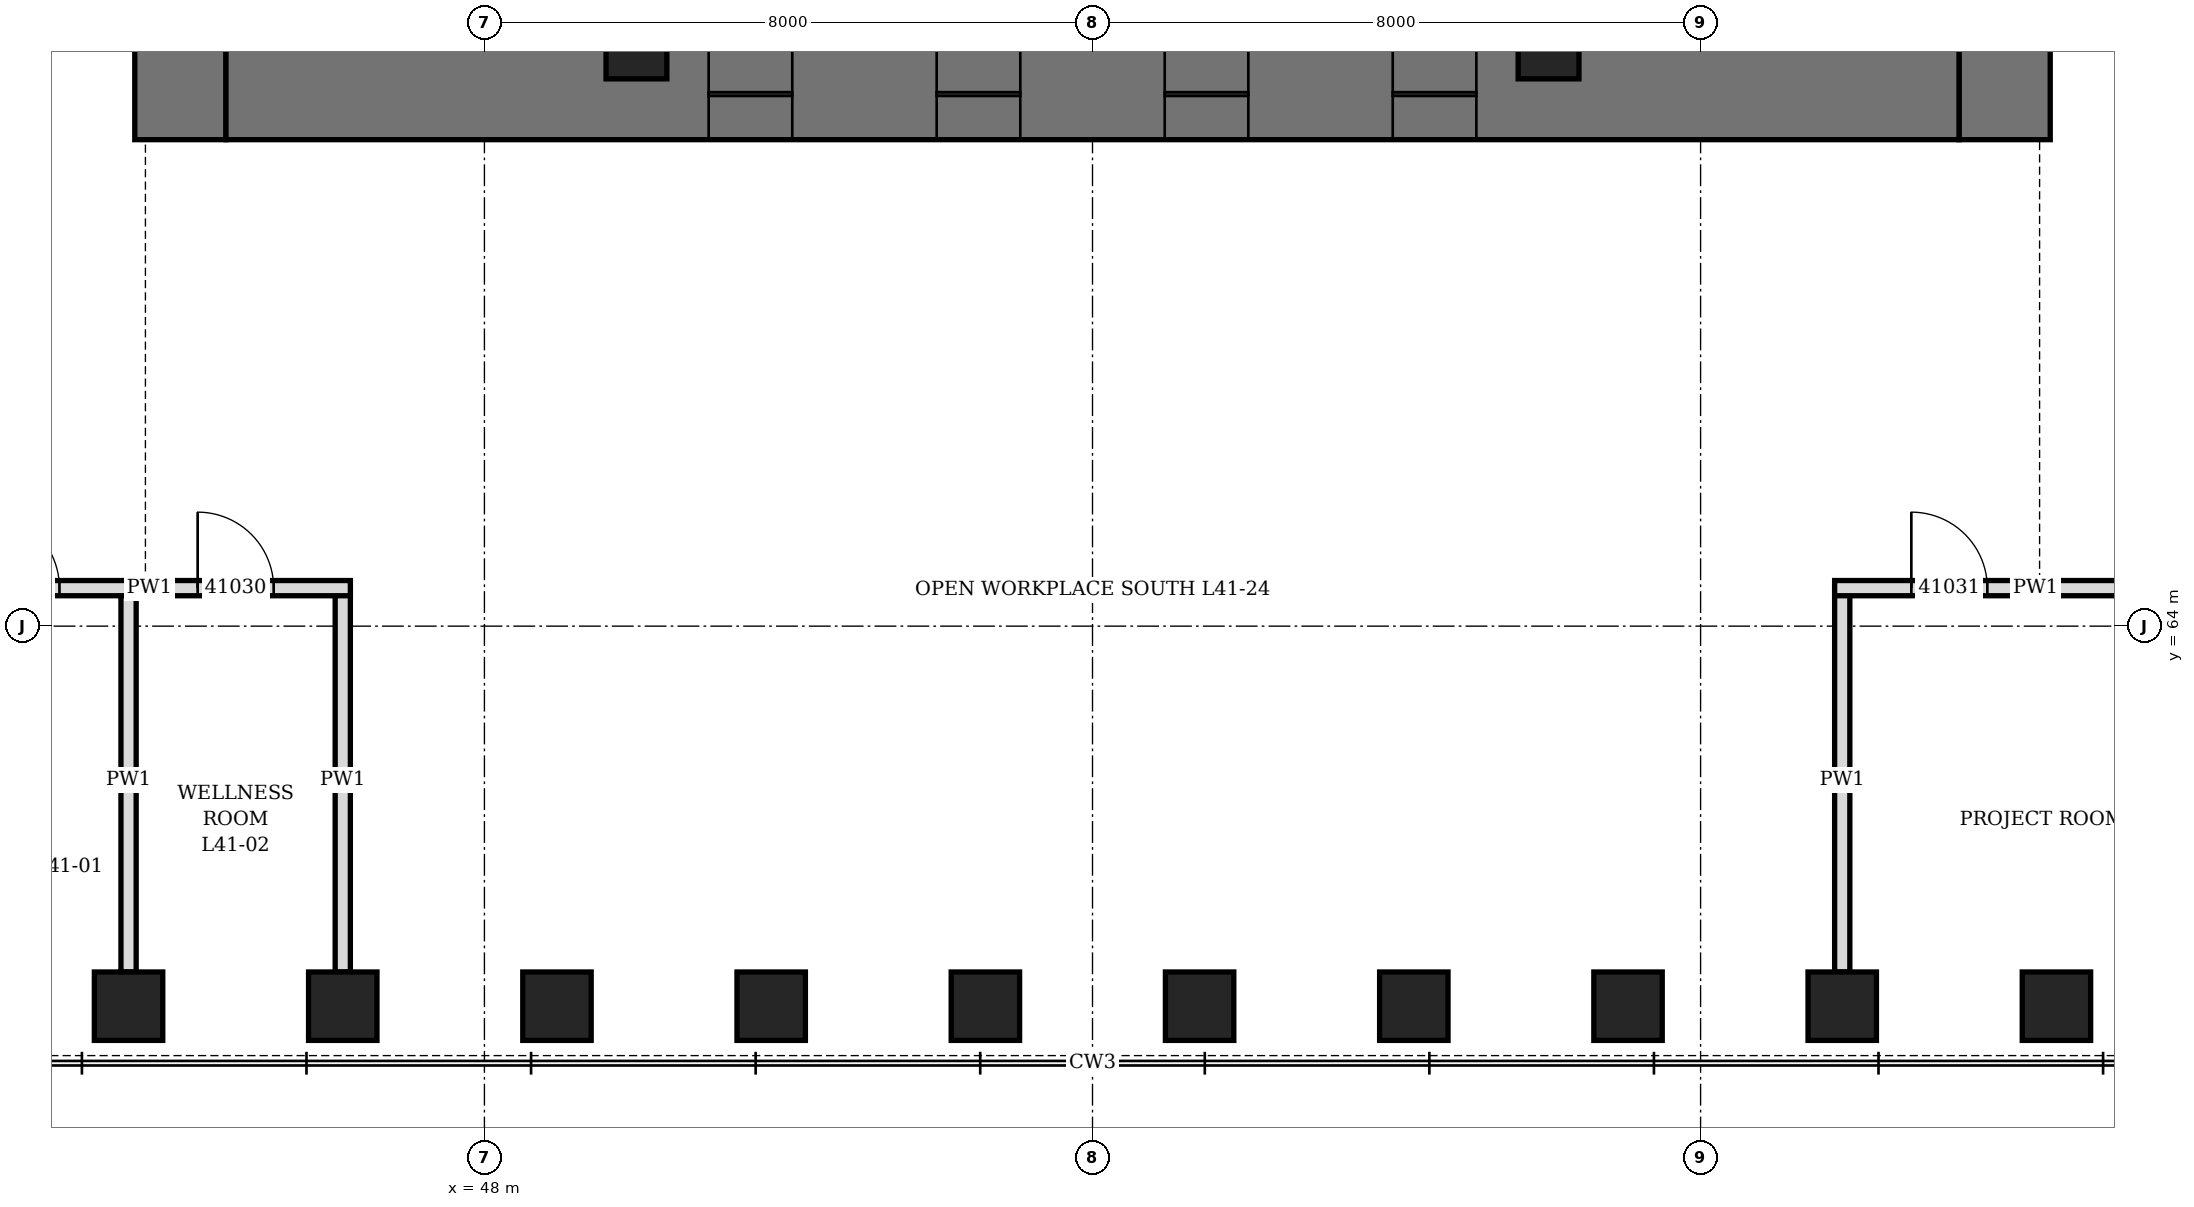
"""IFC4 building model, lengths in metres.
Left out: names, types, materials, properties, quantities, classifications, styles, units other than length and angle.
Written with IfcOpenShell. Run it as: python <this file> out.ifc"""

import sys

from ifc_helpers import new_model, si_unit, direction, frame, frame_2d, origin, origin_2d, place, context, subcontext, project, spatial, rectangle, hollow_rectangle, extrude, element, fill, save


model = new_model("IFC4")
c1 = context("Model", 3, precision=1e-05, world=origin(), true_north=direction((0.0, 1.0)))
c2 = subcontext(c1, "Body", "Model", "MODEL_VIEW")
j1 = project(units=[si_unit("LENGTHUNIT", "METRE"), si_unit("PLANEANGLEUNIT", "RADIAN")], contexts=[c1])
p1 = place(None, origin())
s1 = spatial("IfcSite", under=j1, at=p1, CompositionType="ELEMENT")
p2 = place(p1, origin())
s2 = spatial("IfcBuilding", under=s1, at=p2, CompositionType="ELEMENT")
p3 = place(p2, frame((0.0, 0.0, 185.5)))
s3 = spatial("IfcBuildingStorey", under=s2, at=p3, CompositionType="ELEMENT", Elevation=185.5)
for number, where, z_axis, x_axis in (
    (1, (43.318, 59.0, 0.0), (0.0, 0.0, 1.0), (1.0, 0.0, 0.0)),
    (2, (46.136, 59.0, 0.0), (0.0, 0.0, 1.0), (1.0, 0.0, 0.0)),
    (3, (48.955, 59.0, 0.0), (0.0, 0.0, 1.0), (1.0, 0.0, 0.0)),
    (4, (51.773, 59.0, 0.0), (0.0, 0.0, 1.0), (1.0, 0.0, 0.0)),
    (5, (54.591, 59.0, 0.0), (0.0, 0.0, 1.0), (1.0, 0.0, 0.0)),
    (6, (57.409, 59.0, 0.0), (0.0, 0.0, 1.0), (1.0, 0.0, 0.0)),
    (7, (60.227, 59.0, 0.0), (0.0, 0.0, 1.0), (1.0, 0.0, 0.0)),
    (8, (63.045, 59.0, 0.0), (0.0, 0.0, 1.0), (1.0, 0.0, 0.0)),
    (9, (65.864, 59.0, 0.0), (0.0, 0.0, 1.0), (1.0, 0.0, 0.0)),
    (10, (68.682, 59.0, 0.0), (0.0, 0.0, 1.0), (1.0, 0.0, 0.0)),
):
    element("IfcColumn", number, at=place(p3, frame(where, z_axis=z_axis, x_axis=x_axis)), inside=s3, PredefinedType="COLUMN", context=c2, shape_type="SweptSolid", body=[
        extrude(hollow_rectangle(XDim=0.9, YDim=0.9, WallThickness=0.12, at=origin_2d()), origin(), (0.0, 0.0, 1.0), 4.2),
    ])
p4 = place(p3, frame((44.0, 70.4, 0.0), z_axis=(0.0, 0.0, 1.0), x_axis=(0.0, 1.0, 0.0)))
e11 = element("IfcWall", 11, at=p4, inside=s3, PredefinedType="SHEAR", context=c2, shape_type="SweptSolid", body=[
    extrude(rectangle(XDim=19.2, YDim=1.2, at=frame_2d((9.6, 0.0))), origin(), (0.0, 0.0, 1.0), 4.2),
])
p5 = place(p4, frame((8.6, 0.0, 0.0)))
e12 = element("IfcOpeningElement", 12, at=p5, cuts=e11, PredefinedType="OPENING", context=c2, shape_type="SweptSolid", body=[
    extrude(rectangle(XDim=2.0, YDim=2.4, at=frame_2d((1.0, 1.2))), frame((0.0, 0.61, 0.0), z_axis=(0.0, -1.0, 0.0), x_axis=(1.0, 0.0, 0.0)), (0.0, 0.0, 1.0), 1.22),
])
p6 = place(p3, frame((68.0, 70.4, 0.0), z_axis=(0.0, 0.0, 1.0), x_axis=(0.0, 1.0, 0.0)))
e13 = element("IfcWall", 13, at=p6, inside=s3, PredefinedType="SHEAR", context=c2, shape_type="SweptSolid", body=[
    extrude(rectangle(XDim=19.2, YDim=1.2, at=frame_2d((9.6, 0.0))), origin(), (0.0, 0.0, 1.0), 4.2),
])
p7 = place(p6, frame((8.6, 0.0, 0.0)))
e14 = element("IfcOpeningElement", 14, at=p7, cuts=e13, PredefinedType="OPENING", context=c2, shape_type="SweptSolid", body=[
    extrude(rectangle(XDim=2.0, YDim=2.4, at=frame_2d((1.0, 1.2))), frame((0.0, 0.61, 0.0), z_axis=(0.0, -1.0, 0.0), x_axis=(1.0, 0.0, 0.0)), (0.0, 0.0, 1.0), 1.22),
])
p8 = place(p3, frame((44.6, 71.0, 0.0), z_axis=(0.0, 0.0, 1.0), x_axis=(1.0, 0.0, 0.0)))
e15 = element("IfcWall", 15, at=p8, inside=s3, PredefinedType="SHEAR", context=c2, shape_type="SweptSolid", body=[
    extrude(rectangle(XDim=22.8, YDim=1.2, at=frame_2d((11.4, 0.0))), origin(), (0.0, 0.0, 1.0), 4.2),
])
p9 = place(p8, frame((6.35, 0.0, 0.0)))
e16 = element("IfcOpeningElement", 16, at=p9, cuts=e15, PredefinedType="OPENING", context=c2, shape_type="SweptSolid", body=[
    extrude(rectangle(XDim=1.1, YDim=2.2, at=frame_2d((0.55, 1.1))), frame((0.0, 0.61, 0.0), z_axis=(0.0, -1.0, 0.0), x_axis=(1.0, 0.0, 0.0)), (0.0, 0.0, 1.0), 1.22),
])
p10 = place(p8, frame((9.35, 0.0, 0.0)))
e17 = element("IfcOpeningElement", 17, at=p10, cuts=e15, PredefinedType="OPENING", context=c2, shape_type="SweptSolid", body=[
    extrude(rectangle(XDim=1.1, YDim=2.2, at=frame_2d((0.55, 1.1))), frame((0.0, 0.61, 0.0), z_axis=(0.0, -1.0, 0.0), x_axis=(1.0, 0.0, 0.0)), (0.0, 0.0, 1.0), 1.22),
])
p11 = place(p8, frame((12.35, 0.0, 0.0)))
e18 = element("IfcOpeningElement", 18, at=p11, cuts=e15, PredefinedType="OPENING", context=c2, shape_type="SweptSolid", body=[
    extrude(rectangle(XDim=1.1, YDim=2.2, at=frame_2d((0.55, 1.1))), frame((0.0, 0.61, 0.0), z_axis=(0.0, -1.0, 0.0), x_axis=(1.0, 0.0, 0.0)), (0.0, 0.0, 1.0), 1.22),
])
p12 = place(p8, frame((15.35, 0.0, 0.0)))
e19 = element("IfcOpeningElement", 19, at=p12, cuts=e15, PredefinedType="OPENING", context=c2, shape_type="SweptSolid", body=[
    extrude(rectangle(XDim=1.1, YDim=2.2, at=frame_2d((0.55, 1.1))), frame((0.0, 0.61, 0.0), z_axis=(0.0, -1.0, 0.0), x_axis=(1.0, 0.0, 0.0)), (0.0, 0.0, 1.0), 1.22),
])
for number, where, z_axis, x_axis in (
    (20, (50.0, 71.6, 0.0), (0.0, 0.0, 1.0), (1.0, 0.0, 0.0)),
    (21, (62.0, 71.6, 0.0), (0.0, 0.0, 1.0), (1.0, 0.0, 0.0)),
):
    element("IfcColumn", number, at=place(p3, frame(where, z_axis=z_axis, x_axis=x_axis)), inside=s3, PredefinedType="COLUMN", context=c2, shape_type="SweptSolid", body=[
        extrude(hollow_rectangle(XDim=0.8, YDim=0.8, WallThickness=0.1, at=origin_2d()), origin(), (0.0, 0.0, 1.0), 4.2),
    ])
for number, where, z_axis, x_axis in (
    (22, (43.318, 59.45, 0.0), (0.0, 0.0, 1.0), (0.0, 1.0, 0.0)),
    (23, (46.136, 59.45, 0.0), (0.0, 0.0, 1.0), (0.0, 1.0, 0.0)),
    (24, (65.864, 59.45, 0.0), (0.0, 0.0, 1.0), (0.0, 1.0, 0.0)),
):
    element("IfcWall", number, at=place(p3, frame(where, z_axis=z_axis, x_axis=x_axis)), inside=s3, PredefinedType="PARTITIONING", context=c2, shape_type="SweptSolid", body=[
        extrude(rectangle(XDim=5.05, YDim=0.2, at=frame_2d((2.525, 0.0))), origin(), (0.0, 0.0, 1.0), 3.428),
    ])
p13 = place(p3, frame((40.95, 64.5, 0.0), z_axis=(0.0, 0.0, 1.0), x_axis=(1.0, 0.0, 0.0)))
e25 = element("IfcWall", 25, at=p13, inside=s3, PredefinedType="PARTITIONING", context=c2, shape_type="SweptSolid", body=[
    extrude(rectangle(XDim=5.286, YDim=0.2, at=frame_2d((2.643, 0.0))), origin(), (0.0, 0.0, 1.0), 4.04),
])
p14 = place(p13, frame((0.459, 0.0, 0.0)))
e26 = element("IfcOpeningElement", 26, at=p14, cuts=e25, PredefinedType="OPENING", context=c2, shape_type="SweptSolid", body=[
    extrude(rectangle(XDim=1.0, YDim=2.1, at=frame_2d((0.5, 1.05))), frame((0.0, 0.11, 0.0), z_axis=(0.0, -1.0, 0.0), x_axis=(1.0, 0.0, 0.0)), (0.0, 0.0, 1.0), 0.22),
])
p15 = place(p13, frame((3.277, 0.0, 0.0)))
e27 = element("IfcOpeningElement", 27, at=p15, cuts=e25, PredefinedType="OPENING", context=c2, shape_type="SweptSolid", body=[
    extrude(rectangle(XDim=1.0, YDim=2.1, at=frame_2d((0.5, 1.05))), frame((0.0, 0.11, 0.0), z_axis=(0.0, -1.0, 0.0), x_axis=(1.0, 0.0, 0.0)), (0.0, 0.0, 1.0), 0.22),
])
p16 = place(p3, frame((65.764, 64.5, 0.0), z_axis=(0.0, 0.0, 1.0), x_axis=(1.0, 0.0, 0.0)))
e28 = element("IfcWall", 28, at=p16, inside=s3, PredefinedType="PARTITIONING", context=c2, shape_type="SweptSolid", body=[
    extrude(rectangle(XDim=5.286, YDim=0.2, at=frame_2d((2.643, 0.0))), origin(), (0.0, 0.0, 1.0), 4.04),
])
p17 = place(p16, frame((1.009, 0.0, 0.0)))
e29 = element("IfcOpeningElement", 29, at=p17, cuts=e28, PredefinedType="OPENING", context=c2, shape_type="SweptSolid", body=[
    extrude(rectangle(XDim=1.0, YDim=2.1, at=frame_2d((0.5, 1.05))), frame((0.0, 0.11, 0.0), z_axis=(0.0, -1.0, 0.0), x_axis=(1.0, 0.0, 0.0)), (0.0, 0.0, 1.0), 0.22),
])
p18 = place(p9, origin())
e30 = element("IfcDoor", 30, at=p18, inside=s3, OperationType="SLIDING_TO_LEFT", PredefinedType="DOOR", context=c2, shape_type="SweptSolid", body=[
    extrude(rectangle(XDim=1.1, YDim=2.2, at=frame_2d((0.55, 1.1))), frame((0.0, 0.35, 0.0), z_axis=(0.0, -1.0, 0.0), x_axis=(1.0, 0.0, 0.0)), (0.0, 0.0, 1.0), 0.7),
])
fill(e16, e30)
p19 = place(p10, origin())
e31 = element("IfcDoor", 31, at=p19, inside=s3, OperationType="SLIDING_TO_LEFT", PredefinedType="DOOR", context=c2, shape_type="SweptSolid", body=[
    extrude(rectangle(XDim=1.1, YDim=2.2, at=frame_2d((0.55, 1.1))), frame((0.0, 0.35, 0.0), z_axis=(0.0, -1.0, 0.0), x_axis=(1.0, 0.0, 0.0)), (0.0, 0.0, 1.0), 0.7),
])
fill(e17, e31)
p20 = place(p11, origin())
e32 = element("IfcDoor", 32, at=p20, inside=s3, OperationType="SLIDING_TO_LEFT", PredefinedType="DOOR", context=c2, shape_type="SweptSolid", body=[
    extrude(rectangle(XDim=1.1, YDim=2.2, at=frame_2d((0.55, 1.1))), frame((0.0, 0.35, 0.0), z_axis=(0.0, -1.0, 0.0), x_axis=(1.0, 0.0, 0.0)), (0.0, 0.0, 1.0), 0.7),
])
fill(e18, e32)
p21 = place(p12, origin())
e33 = element("IfcDoor", 33, at=p21, inside=s3, OperationType="SLIDING_TO_LEFT", PredefinedType="DOOR", context=c2, shape_type="SweptSolid", body=[
    extrude(rectangle(XDim=1.1, YDim=2.2, at=frame_2d((0.55, 1.1))), frame((0.0, 0.35, 0.0), z_axis=(0.0, -1.0, 0.0), x_axis=(1.0, 0.0, 0.0)), (0.0, 0.0, 1.0), 0.7),
])
fill(e19, e33)
p22 = place(p14, origin())
e34 = element("IfcDoor", 34, at=p22, inside=s3, OperationType="SINGLE_SWING_LEFT", PredefinedType="DOOR", context=c2, shape_type="SweptSolid", body=[
    extrude(rectangle(XDim=1.0, YDim=2.1, at=frame_2d((0.5, 1.05))), frame((0.0, 0.1, 0.0), z_axis=(0.0, -1.0, 0.0), x_axis=(1.0, 0.0, 0.0)), (0.0, 0.0, 1.0), 0.199),
])
fill(e26, e34)
p23 = place(p15, origin())
e35 = element("IfcDoor", 35, at=p23, inside=s3, OperationType="SINGLE_SWING_LEFT", PredefinedType="DOOR", context=c2, shape_type="SweptSolid", body=[
    extrude(rectangle(XDim=1.0, YDim=2.1, at=frame_2d((0.5, 1.05))), frame((0.0, 0.1, 0.0), z_axis=(0.0, -1.0, 0.0), x_axis=(1.0, 0.0, 0.0)), (0.0, 0.0, 1.0), 0.199),
])
fill(e27, e35)
p24 = place(p17, origin())
e36 = element("IfcDoor", 36, at=p24, inside=s3, OperationType="SINGLE_SWING_LEFT", PredefinedType="DOOR", context=c2, shape_type="SweptSolid", body=[
    extrude(rectangle(XDim=1.0, YDim=2.1, at=frame_2d((0.5, 1.05))), frame((0.0, 0.1, 0.0), z_axis=(0.0, -1.0, 0.0), x_axis=(1.0, 0.0, 0.0)), (0.0, 0.0, 1.0), 0.199),
])
fill(e29, e36)
save(model, sys.argv[1])
